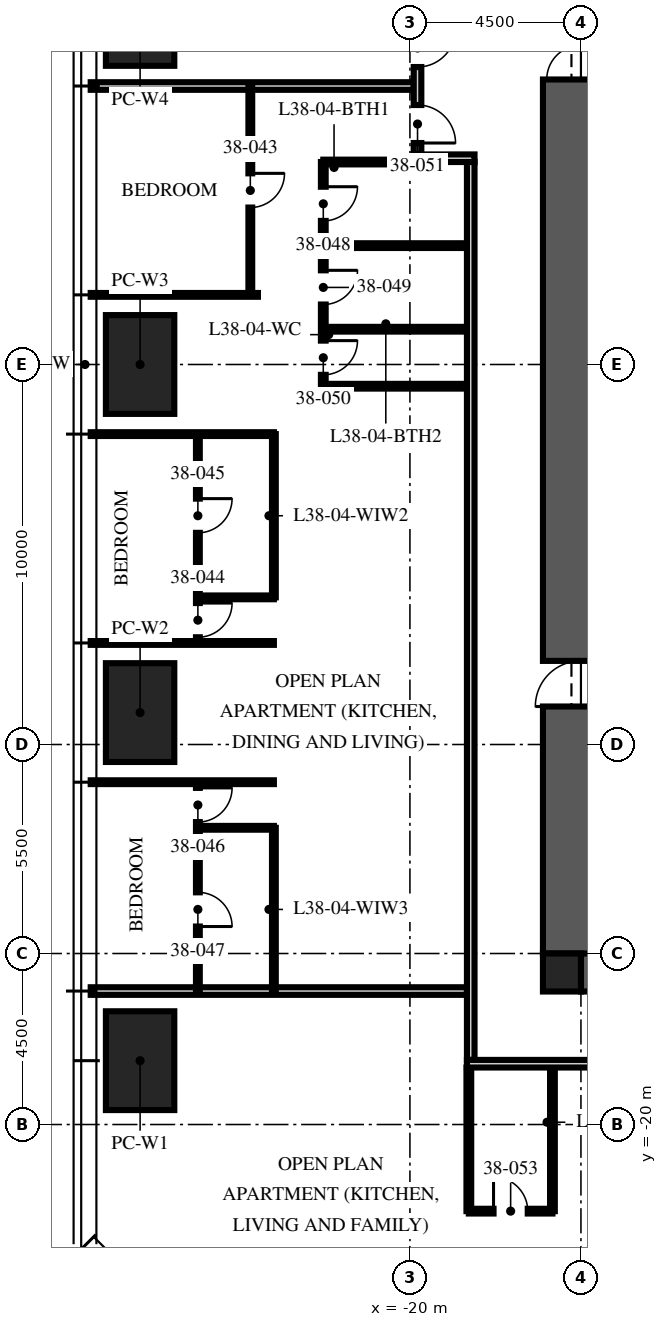
"""IFC4 building model, lengths in metres.
Left out: names, types, materials, properties, quantities, classifications, styles, units other than length and angle.
Written with IfcOpenShell. Run it as: python <this file> out.ifc"""

import sys

from ifc_helpers import new_model, si_unit, direction, frame, frame_2d, origin, origin_2d, place, context, subcontext, project, spatial, rectangle, extrude, element, fill, save


model = new_model("IFC4")
c1 = context("Model", 3, precision=1e-05, world=origin(), true_north=direction((0.0, 1.0)))
c2 = subcontext(c1, "Body", "Model", "MODEL_VIEW")
j1 = project(units=[si_unit("LENGTHUNIT", "METRE"), si_unit("PLANEANGLEUNIT", "RADIAN")], contexts=[c1])
p1 = place(None, origin())
s1 = spatial("IfcSite", under=j1, at=p1, CompositionType="ELEMENT")
p2 = place(p1, origin())
s2 = spatial("IfcBuilding", under=s1, at=p2, CompositionType="ELEMENT")
p3 = place(p2, frame((0.0, 0.0, 152.25)))
s3 = spatial("IfcBuildingStorey", under=s2, at=p3, CompositionType="ELEMENT", Elevation=152.25)
p4 = place(p3, frame((-15.5, -15.5, -0.25), z_axis=(0.0, 0.0, 1.0), x_axis=(1.0, 0.0, 0.0)))
e1 = element("IfcWall", 1, at=p4, inside=s3, PredefinedType="SHEAR", context=c2, shape_type="SweptSolid", body=[
    extrude(rectangle(XDim=31.0, YDim=2.0, at=frame_2d((15.5, 0.0))), origin(), (0.0, 0.0, 1.0), 3.75),
])
p5 = place(p4, frame((10.4, 0.0, 0.25)))
e2 = element("IfcOpeningElement", 2, at=p5, cuts=e1, PredefinedType="OPENING", context=c2, shape_type="SweptSolid", body=[
    extrude(rectangle(XDim=1.1, YDim=2.1, at=frame_2d((0.55, 1.05))), frame((0.0, 1.01, 0.0), z_axis=(0.0, -1.0, 0.0), x_axis=(1.0, 0.0, 0.0)), (0.0, 0.0, 1.0), 2.02),
])
p6 = place(p4, frame((13.5, 0.0, 0.25)))
e3 = element("IfcOpeningElement", 3, at=p6, cuts=e1, PredefinedType="OPENING", context=c2, shape_type="SweptSolid", body=[
    extrude(rectangle(XDim=1.1, YDim=2.1, at=frame_2d((0.55, 1.05))), frame((0.0, 1.01, 0.0), z_axis=(0.0, -1.0, 0.0), x_axis=(1.0, 0.0, 0.0)), (0.0, 0.0, 1.0), 2.02),
])
p7 = place(p4, frame((16.6, 0.0, 0.25)))
e4 = element("IfcOpeningElement", 4, at=p7, cuts=e1, PredefinedType="OPENING", context=c2, shape_type="SweptSolid", body=[
    extrude(rectangle(XDim=1.1, YDim=2.1, at=frame_2d((0.55, 1.05))), frame((0.0, 1.01, 0.0), z_axis=(0.0, -1.0, 0.0), x_axis=(1.0, 0.0, 0.0)), (0.0, 0.0, 1.0), 2.02),
])
p8 = place(p3, frame((-15.5, -12.0, -0.25), z_axis=(0.0, 0.0, 1.0), x_axis=(1.0, 0.0, 0.0)))
e5 = element("IfcWall", 5, at=p8, inside=s3, PredefinedType="SHEAR", context=c2, shape_type="SweptSolid", body=[
    extrude(rectangle(XDim=31.0, YDim=0.8, at=frame_2d((15.5, 0.0))), origin(), (0.0, 0.0, 1.0), 3.75),
])
p9 = place(p3, frame((-15.5, -15.5, -0.25), z_axis=(0.0, 0.0, 1.0), x_axis=(0.0, 1.0, 0.0)))
e6 = element("IfcWall", 6, at=p9, inside=s3, PredefinedType="SHEAR", context=c2, shape_type="SweptSolid", body=[
    extrude(rectangle(XDim=31.0, YDim=2.0, at=frame_2d((15.5, 0.0))), origin(), (0.0, 0.0, 1.0), 3.75),
])
p10 = place(p9, frame((6.5, 0.0, 0.25)))
e7 = element("IfcOpeningElement", 7, at=p10, cuts=e6, PredefinedType="OPENING", context=c2, shape_type="SweptSolid", body=[
    extrude(rectangle(XDim=1.2, YDim=2.1, at=frame_2d((0.6, 1.05))), frame((0.0, 1.01, 0.0), z_axis=(0.0, -1.0, 0.0), x_axis=(1.0, 0.0, 0.0)), (0.0, 0.0, 1.0), 2.02),
])
p11 = place(p9, frame((23.0, 0.0, 0.25)))
e8 = element("IfcOpeningElement", 8, at=p11, cuts=e6, PredefinedType="OPENING", context=c2, shape_type="SweptSolid", body=[
    extrude(rectangle(XDim=1.8, YDim=2.1, at=frame_2d((0.9, 1.05))), frame((0.0, 1.01, 0.0), z_axis=(0.0, -1.0, 0.0), x_axis=(1.0, 0.0, 0.0)), (0.0, 0.0, 1.0), 2.02),
])
p12 = place(p3, frame((-16.0, -16.0, -0.25), z_axis=(0.0, 0.0, 1.0), x_axis=(1.0, 0.0, 0.0)))
e9 = element("IfcColumn", 9, at=p12, inside=s3, PredefinedType="COLUMN", context=c2, shape_type="SweptSolid", body=[
    extrude(rectangle(XDim=1.0, YDim=1.0, at=origin_2d()), origin(), (0.0, 0.0, 1.0), 3.75),
])
for number, where, z_axis, x_axis in (
    (10, (-27.1, -18.32, 0.0), (0.0, 0.0, 1.0), (0.0, 1.0, 0.0)),
    (11, (-27.1, -9.16, 0.0), (0.0, 0.0, 1.0), (0.0, 1.0, 0.0)),
    (12, (-27.1, 0.0, 0.0), (0.0, 0.0, 1.0), (0.0, 1.0, 0.0)),
    (13, (-27.1, 9.16, 0.0), (0.0, 0.0, 1.0), (0.0, 1.0, 0.0)),
):
    element("IfcColumn", number, at=place(p3, frame(where, z_axis=z_axis, x_axis=x_axis)), inside=s3, PredefinedType="COLUMN", context=c2, shape_type="SweptSolid", body=[
        extrude(rectangle(XDim=2.6, YDim=1.8, at=origin_2d()), origin(), (0.0, 0.0, 1.0), 3.75),
    ])
p13 = place(p3, frame((-19.9, 7.328, 0.0), z_axis=(0.0, 0.0, 1.0), x_axis=(-1.0, 0.0, 0.0)))
e14 = element("IfcWall", 14, at=p13, inside=s3, PredefinedType="PARTITIONING", context=c2, shape_type="SweptSolid", body=[
    extrude(rectangle(XDim=8.5, YDim=0.2, at=frame_2d((4.25, 0.0))), origin(), (0.0, 0.0, 1.0), 2.81),
])
p14 = place(p3, frame((-24.0, 1.832, 0.0), z_axis=(0.0, 0.0, 1.0), x_axis=(-1.0, 0.0, 0.0)))
e15 = element("IfcWall", 15, at=p14, inside=s3, PredefinedType="PARTITIONING", context=c2, shape_type="SweptSolid", body=[
    extrude(rectangle(XDim=4.4, YDim=0.1, at=frame_2d((2.2, 0.0))), origin(), (0.0, 0.0, 1.0), 2.81),
])
for number, where, z_axis, x_axis in (
    (16, (-23.58, -1.832, 0.0), (0.0, 0.0, 1.0), (-1.0, 0.0, 0.0)),
    (17, (-23.58, -7.328, 0.0), (0.0, 0.0, 1.0), (-1.0, 0.0, 0.0)),
    (18, (-23.58, -10.992, 0.0), (0.0, 0.0, 1.0), (-1.0, 0.0, 0.0)),
):
    element("IfcWall", number, at=place(p3, frame(where, z_axis=z_axis, x_axis=x_axis)), inside=s3, PredefinedType="PARTITIONING", context=c2, shape_type="SweptSolid", body=[
        extrude(rectangle(XDim=4.82, YDim=0.1, at=frame_2d((2.41, 0.0))), origin(), (0.0, 0.0, 1.0), 2.81),
    ])
p15 = place(p3, frame((-18.5, -16.488, 0.0), z_axis=(0.0, 0.0, 1.0), x_axis=(-1.0, 0.0, 0.0)))
e19 = element("IfcWall", 19, at=p15, inside=s3, PredefinedType="PARTITIONING", context=c2, shape_type="SweptSolid", body=[
    extrude(rectangle(XDim=9.9, YDim=0.2, at=frame_2d((4.95, 0.0))), origin(), (0.0, 0.0, 1.0), 2.81),
])
p16 = place(p3, frame((-24.2, 7.328, 0.0), z_axis=(0.0, 0.0, 1.0), x_axis=(0.0, -1.0, 0.0)))
e20 = element("IfcWall", 20, at=p16, inside=s3, PredefinedType="PARTITIONING", context=c2, shape_type="SweptSolid", body=[
    extrude(rectangle(XDim=5.496, YDim=0.1, at=frame_2d((2.748, 0.0))), origin(), (0.0, 0.0, 1.0), 2.81),
])
p17 = place(p16, frame((2.298, 0.0, 0.0)))
e21 = element("IfcOpeningElement", 21, at=p17, cuts=e20, PredefinedType="OPENING", context=c2, shape_type="SweptSolid", body=[
    extrude(rectangle(XDim=0.9, YDim=2.1, at=frame_2d((0.45, 1.05))), frame((0.0, 0.06, 0.0), z_axis=(0.0, -1.0, 0.0), x_axis=(1.0, 0.0, 0.0)), (0.0, 0.0, 1.0), 0.12),
])
p18 = place(p3, frame((-25.58, -1.832, 0.0), z_axis=(0.0, 0.0, 1.0), x_axis=(0.0, -1.0, 0.0)))
e22 = element("IfcWall", 22, at=p18, inside=s3, PredefinedType="PARTITIONING", context=c2, shape_type="SweptSolid", body=[
    extrude(rectangle(XDim=5.496, YDim=0.1, at=frame_2d((2.748, 0.0))), origin(), (0.0, 0.0, 1.0), 2.81),
])
p19 = place(p18, frame((4.446, 0.0, 0.0)))
e23 = element("IfcOpeningElement", 23, at=p19, cuts=e22, PredefinedType="OPENING", context=c2, shape_type="SweptSolid", body=[
    extrude(rectangle(XDim=0.9, YDim=2.1, at=frame_2d((0.45, 1.05))), frame((0.0, 0.06, 0.0), z_axis=(0.0, -1.0, 0.0), x_axis=(1.0, 0.0, 0.0)), (0.0, 0.0, 1.0), 0.12),
])
p20 = place(p18, frame((1.698, 0.0, 0.0)))
e24 = element("IfcOpeningElement", 24, at=p20, cuts=e22, PredefinedType="OPENING", context=c2, shape_type="SweptSolid", body=[
    extrude(rectangle(XDim=0.9, YDim=2.1, at=frame_2d((0.45, 1.05))), frame((0.0, 0.06, 0.0), z_axis=(0.0, -1.0, 0.0), x_axis=(1.0, 0.0, 0.0)), (0.0, 0.0, 1.0), 0.12),
])
p21 = place(p3, frame((-23.58, -6.128, 0.0), z_axis=(0.0, 0.0, 1.0), x_axis=(-1.0, 0.0, 0.0)))
e25 = element("IfcWall", 25, at=p21, inside=s3, PredefinedType="PARTITIONING", context=c2, shape_type="SweptSolid", body=[
    extrude(rectangle(XDim=2.0, YDim=0.1, at=frame_2d((1.0, 0.0))), origin(), (0.0, 0.0, 1.0), 3.5),
])
p22 = place(p3, frame((-23.58, -1.832, 0.0), z_axis=(0.0, 0.0, 1.0), x_axis=(0.0, -1.0, 0.0)))
e26 = element("IfcWall", 26, at=p22, inside=s3, PredefinedType="PARTITIONING", context=c2, shape_type="SweptSolid", body=[
    extrude(rectangle(XDim=4.296, YDim=0.1, at=frame_2d((2.148, 0.0))), origin(), (0.0, 0.0, 1.0), 2.81),
])
p23 = place(p3, frame((-25.58, -10.992, 0.0), z_axis=(0.0, 0.0, 1.0), x_axis=(0.0, -1.0, 0.0)))
e27 = element("IfcWall", 27, at=p23, inside=s3, PredefinedType="PARTITIONING", context=c2, shape_type="SweptSolid", body=[
    extrude(rectangle(XDim=5.496, YDim=0.1, at=frame_2d((2.748, 0.0))), origin(), (0.0, 0.0, 1.0), 2.81),
])
p24 = place(p23, frame((0.15, 0.0, 0.0)))
e28 = element("IfcOpeningElement", 28, at=p24, cuts=e27, PredefinedType="OPENING", context=c2, shape_type="SweptSolid", body=[
    extrude(rectangle(XDim=0.9, YDim=2.1, at=frame_2d((0.45, 1.05))), frame((0.0, 0.06, 0.0), z_axis=(0.0, -1.0, 0.0), x_axis=(1.0, 0.0, 0.0)), (0.0, 0.0, 1.0), 0.12),
])
p25 = place(p23, frame((2.898, 0.0, 0.0)))
e29 = element("IfcOpeningElement", 29, at=p25, cuts=e27, PredefinedType="OPENING", context=c2, shape_type="SweptSolid", body=[
    extrude(rectangle(XDim=0.9, YDim=2.1, at=frame_2d((0.45, 1.05))), frame((0.0, 0.06, 0.0), z_axis=(0.0, -1.0, 0.0), x_axis=(1.0, 0.0, 0.0)), (0.0, 0.0, 1.0), 0.12),
])
p26 = place(p3, frame((-23.58, -12.192, 0.0), z_axis=(0.0, 0.0, 1.0), x_axis=(-1.0, 0.0, 0.0)))
e30 = element("IfcWall", 30, at=p26, inside=s3, PredefinedType="PARTITIONING", context=c2, shape_type="SweptSolid", body=[
    extrude(rectangle(XDim=2.0, YDim=0.1, at=frame_2d((1.0, 0.0))), origin(), (0.0, 0.0, 1.0), 3.5),
])
p27 = place(p3, frame((-23.58, -12.192, 0.0), z_axis=(0.0, 0.0, 1.0), x_axis=(0.0, -1.0, 0.0)))
e31 = element("IfcWall", 31, at=p27, inside=s3, PredefinedType="PARTITIONING", context=c2, shape_type="SweptSolid", body=[
    extrude(rectangle(XDim=4.296, YDim=0.1, at=frame_2d((2.148, 0.0))), origin(), (0.0, 0.0, 1.0), 2.81),
])
p28 = place(p3, frame((-22.28, 5.328, 0.0), z_axis=(0.0, 0.0, 1.0), x_axis=(0.0, -1.0, 0.0)))
e32 = element("IfcWall", 32, at=p28, inside=s3, PredefinedType="PARTITIONING", context=c2, shape_type="SweptSolid", body=[
    extrude(rectangle(XDim=5.9, YDim=0.125, at=frame_2d((2.95, 0.0))), origin(), (0.0, 0.0, 1.0), 2.7),
])
p29 = place(p28, frame((0.65, 0.0, 0.0)))
e33 = element("IfcOpeningElement", 33, at=p29, cuts=e32, PredefinedType="OPENING", context=c2, shape_type="SweptSolid", body=[
    extrude(rectangle(XDim=0.9, YDim=2.1, at=frame_2d((0.45, 1.05))), frame((0.0, 0.073, 0.0), z_axis=(0.0, -1.0, 0.0), x_axis=(1.0, 0.0, 0.0)), (0.0, 0.0, 1.0), 0.145),
])
p30 = place(p28, frame((2.85, 0.0, 0.0)))
e34 = element("IfcOpeningElement", 34, at=p30, cuts=e32, PredefinedType="OPENING", context=c2, shape_type="SweptSolid", body=[
    extrude(rectangle(XDim=0.9, YDim=2.1, at=frame_2d((0.45, 1.05))), frame((0.0, 0.073, 0.0), z_axis=(0.0, -1.0, 0.0), x_axis=(1.0, 0.0, 0.0)), (0.0, 0.0, 1.0), 0.145),
])
p31 = place(p28, frame((4.7, 0.0, 0.0)))
e35 = element("IfcOpeningElement", 35, at=p31, cuts=e32, PredefinedType="OPENING", context=c2, shape_type="SweptSolid", body=[
    extrude(rectangle(XDim=0.9, YDim=2.1, at=frame_2d((0.45, 1.05))), frame((0.0, 0.073, 0.0), z_axis=(0.0, -1.0, 0.0), x_axis=(1.0, 0.0, 0.0)), (0.0, 0.0, 1.0), 0.145),
])
p32 = place(p3, frame((-19.97, 5.328, 0.0), z_axis=(0.0, 0.0, 1.0), x_axis=(-1.0, 0.0, 0.0)))
e36 = element("IfcWall", 36, at=p32, inside=s3, PredefinedType="PARTITIONING", context=c2, shape_type="SweptSolid", body=[
    extrude(rectangle(XDim=2.31, YDim=0.125, at=frame_2d((1.155, 0.0))), origin(), (0.0, 0.0, 1.0), 3.5),
])
for number, where, z_axis, x_axis in (
    (37, (-18.5, 3.128, 0.0), (0.0, 0.0, 1.0), (-1.0, 0.0, 0.0)),
    (38, (-18.5, 0.928, 0.0), (0.0, 0.0, 1.0), (-1.0, 0.0, 0.0)),
    (39, (-18.5, -0.572, 0.0), (0.0, 0.0, 1.0), (-1.0, 0.0, 0.0)),
):
    element("IfcWall", number, at=place(p3, frame(where, z_axis=z_axis, x_axis=x_axis)), inside=s3, PredefinedType="PARTITIONING", context=c2, shape_type="SweptSolid", body=[
        extrude(rectangle(XDim=3.78, YDim=0.125, at=frame_2d((1.89, 0.0))), origin(), (0.0, 0.0, 1.0), 3.5),
    ])
p33 = place(p3, frame((-18.45, -22.28, 0.0), z_axis=(0.0, 0.0, 1.0), x_axis=(1.0, 0.0, 0.0)))
e40 = element("IfcWall", 40, at=p33, inside=s3, PredefinedType="PARTITIONING", context=c2, shape_type="SweptSolid", body=[
    extrude(rectangle(XDim=2.2, YDim=0.125, at=frame_2d((1.1, 0.0))), origin(), (0.0, 0.0, 1.0), 2.7),
])
p34 = place(p33, frame((0.65, 0.0, 0.0)))
e41 = element("IfcOpeningElement", 41, at=p34, cuts=e40, PredefinedType="OPENING", context=c2, shape_type="SweptSolid", body=[
    extrude(rectangle(XDim=0.9, YDim=2.1, at=frame_2d((0.45, 1.05))), frame((0.0, 0.073, 0.0), z_axis=(0.0, -1.0, 0.0), x_axis=(1.0, 0.0, 0.0)), (0.0, 0.0, 1.0), 0.145),
])
p35 = place(p3, frame((-18.45, -18.5, 0.0), z_axis=(0.0, 0.0, 1.0), x_axis=(0.0, -1.0, 0.0)))
e42 = element("IfcWall", 42, at=p35, inside=s3, PredefinedType="PARTITIONING", context=c2, shape_type="SweptSolid", body=[
    extrude(rectangle(XDim=3.78, YDim=0.125, at=frame_2d((1.89, 0.0))), origin(), (0.0, 0.0, 1.0), 2.3),
])
p36 = place(p3, frame((-16.25, -18.5, 0.0), z_axis=(0.0, 0.0, 1.0), x_axis=(0.0, -1.0, 0.0)))
e43 = element("IfcWall", 43, at=p36, inside=s3, PredefinedType="PARTITIONING", context=c2, shape_type="SweptSolid", body=[
    extrude(rectangle(XDim=3.78, YDim=0.125, at=frame_2d((1.89, 0.0))), origin(), (0.0, 0.0, 1.0), 3.5),
])
p37 = place(p3, frame((-18.3, 5.428, 0.0), z_axis=(0.0, 0.0, 1.0), x_axis=(-1.0, 0.0, 0.0)))
e44 = element("IfcWall", 44, at=p37, inside=s3, PredefinedType="PARTITIONING", context=c2, shape_type="SweptSolid", body=[
    extrude(rectangle(XDim=1.6, YDim=0.2, at=frame_2d((0.8, 0.0))), origin(), (0.0, 0.0, 1.0), 3.5),
])
p38 = place(p3, frame((-19.8, 9.128, 0.0), z_axis=(0.0, 0.0, 1.0), x_axis=(0.0, -1.0, 0.0)))
e45 = element("IfcWall", 45, at=p38, inside=s3, PredefinedType="PARTITIONING", context=c2, shape_type="SweptSolid", body=[
    extrude(rectangle(XDim=3.6, YDim=0.2, at=frame_2d((1.8, 0.0))), origin(), (0.0, 0.0, 1.0), 2.7),
])
p39 = place(p38, frame((0.3, 0.0, 0.0)))
e46 = element("IfcOpeningElement", 46, at=p39, cuts=e45, PredefinedType="OPENING", context=c2, shape_type="SweptSolid", body=[
    extrude(rectangle(XDim=1.0, YDim=2.2, at=frame_2d((0.5, 1.1))), frame((0.0, 0.11, 0.0), z_axis=(0.0, -1.0, 0.0), x_axis=(1.0, 0.0, 0.0)), (0.0, 0.0, 1.0), 0.22),
])
p40 = place(p38, frame((2.3, 0.0, 0.0)))
e47 = element("IfcOpeningElement", 47, at=p40, cuts=e45, PredefinedType="OPENING", context=c2, shape_type="SweptSolid", body=[
    extrude(rectangle(XDim=1.0, YDim=2.2, at=frame_2d((0.5, 1.1))), frame((0.0, 0.11, 0.0), z_axis=(0.0, -1.0, 0.0), x_axis=(1.0, 0.0, 0.0)), (0.0, 0.0, 1.0), 0.22),
])
p41 = place(p3, frame((-18.4, 5.328, 0.0), z_axis=(0.0, 0.0, 1.0), x_axis=(0.0, -1.0, 0.0)))
e48 = element("IfcWall", 48, at=p41, inside=s3, PredefinedType="PARTITIONING", context=c2, shape_type="SweptSolid", body=[
    extrude(rectangle(XDim=23.628, YDim=0.2, at=frame_2d((11.814, 0.0))), origin(), (0.0, 0.0, 1.0), 2.3),
])
p42 = place(p3, frame((-8.6, -18.4, 0.0), z_axis=(0.0, 0.0, 1.0), x_axis=(-1.0, 0.0, 0.0)))
e49 = element("IfcWall", 49, at=p42, inside=s3, PredefinedType="PARTITIONING", context=c2, shape_type="SweptSolid", body=[
    extrude(rectangle(XDim=9.9, YDim=0.2, at=frame_2d((4.95, 0.0))), origin(), (0.0, 0.0, 1.0), 2.3),
])
p43 = place(p42, frame((0.75, 0.0, 0.0)))
e50 = element("IfcOpeningElement", 50, at=p43, cuts=e49, PredefinedType="OPENING", context=c2, shape_type="SweptSolid", body=[
    extrude(rectangle(XDim=1.0, YDim=2.2, at=frame_2d((0.5, 1.1))), frame((0.0, 0.11, 0.0), z_axis=(0.0, -1.0, 0.0), x_axis=(1.0, 0.0, 0.0)), (0.0, 0.0, 1.0), 0.22),
])
p44 = place(p10, origin())
e51 = element("IfcDoor", 51, at=p44, inside=s3, OperationType="SINGLE_SWING_LEFT", PredefinedType="DOOR", context=c2, shape_type="SweptSolid", body=[
    extrude(rectangle(XDim=1.2, YDim=2.1, at=frame_2d((0.6, 1.05))), frame((0.0, 0.025, 0.0), z_axis=(0.0, -1.0, 0.0), x_axis=(1.0, 0.0, 0.0)), (0.0, 0.0, 1.0), 0.05),
])
fill(e7, e51)
p45 = place(p11, origin())
e52 = element("IfcDoor", 52, at=p45, inside=s3, OperationType="DOUBLE_DOOR_SINGLE_SWING", PredefinedType="DOOR", context=c2, shape_type="SweptSolid", body=[
    extrude(rectangle(XDim=1.8, YDim=2.1, at=frame_2d((0.9, 1.05))), frame((0.0, 0.025, 0.0), z_axis=(0.0, -1.0, 0.0), x_axis=(1.0, 0.0, 0.0)), (0.0, 0.0, 1.0), 0.05),
])
fill(e8, e52)
p46 = place(p39, origin())
e53 = element("IfcDoor", 53, at=p46, inside=s3, OperationType="SINGLE_SWING_LEFT", PredefinedType="DOOR", context=c2, shape_type="SweptSolid", body=[
    extrude(rectangle(XDim=1.0, YDim=2.2, at=frame_2d((0.5, 1.1))), frame((0.0, 0.025, 0.0), z_axis=(0.0, -1.0, 0.0), x_axis=(1.0, 0.0, 0.0)), (0.0, 0.0, 1.0), 0.05),
])
fill(e46, e53)
p47 = place(p17, origin())
e54 = element("IfcDoor", 54, at=p47, inside=s3, OperationType="SINGLE_SWING_LEFT", PredefinedType="DOOR", context=c2, shape_type="SweptSolid", body=[
    extrude(rectangle(XDim=0.9, YDim=2.1, at=frame_2d((0.45, 1.05))), frame((0.0, 0.025, 0.0), z_axis=(0.0, -1.0, 0.0), x_axis=(1.0, 0.0, 0.0)), (0.0, 0.0, 1.0), 0.05),
])
fill(e21, e54)
p48 = place(p19, origin())
e55 = element("IfcDoor", 55, at=p48, inside=s3, OperationType="SINGLE_SWING_LEFT", PredefinedType="DOOR", context=c2, shape_type="SweptSolid", body=[
    extrude(rectangle(XDim=0.9, YDim=2.1, at=frame_2d((0.45, 1.05))), frame((0.0, 0.025, 0.0), z_axis=(0.0, -1.0, 0.0), x_axis=(1.0, 0.0, 0.0)), (0.0, 0.0, 1.0), 0.05),
])
fill(e23, e55)
p49 = place(p20, origin())
e56 = element("IfcDoor", 56, at=p49, inside=s3, OperationType="SINGLE_SWING_LEFT", PredefinedType="DOOR", context=c2, shape_type="SweptSolid", body=[
    extrude(rectangle(XDim=0.9, YDim=2.1, at=frame_2d((0.45, 1.05))), frame((0.0, 0.025, 0.0), z_axis=(0.0, -1.0, 0.0), x_axis=(1.0, 0.0, 0.0)), (0.0, 0.0, 1.0), 0.05),
])
fill(e24, e56)
p50 = place(p24, origin())
e57 = element("IfcDoor", 57, at=p50, inside=s3, OperationType="SINGLE_SWING_LEFT", PredefinedType="DOOR", context=c2, shape_type="SweptSolid", body=[
    extrude(rectangle(XDim=0.9, YDim=2.1, at=frame_2d((0.45, 1.05))), frame((0.0, 0.025, 0.0), z_axis=(0.0, -1.0, 0.0), x_axis=(1.0, 0.0, 0.0)), (0.0, 0.0, 1.0), 0.05),
])
fill(e28, e57)
p51 = place(p25, origin())
e58 = element("IfcDoor", 58, at=p51, inside=s3, OperationType="SINGLE_SWING_RIGHT", PredefinedType="DOOR", context=c2, shape_type="SweptSolid", body=[
    extrude(rectangle(XDim=0.9, YDim=2.1, at=frame_2d((0.45, 1.05))), frame((0.0, 0.025, 0.0), z_axis=(0.0, -1.0, 0.0), x_axis=(1.0, 0.0, 0.0)), (0.0, 0.0, 1.0), 0.05),
])
fill(e29, e58)
p52 = place(p29, origin())
e59 = element("IfcDoor", 59, at=p52, inside=s3, OperationType="SINGLE_SWING_LEFT", PredefinedType="DOOR", context=c2, shape_type="SweptSolid", body=[
    extrude(rectangle(XDim=0.9, YDim=2.1, at=frame_2d((0.45, 1.05))), frame((0.0, 0.025, 0.0), z_axis=(0.0, -1.0, 0.0), x_axis=(1.0, 0.0, 0.0)), (0.0, 0.0, 1.0), 0.05),
])
fill(e33, e59)
p53 = place(p30, origin())
e60 = element("IfcDoor", 60, at=p53, inside=s3, OperationType="SINGLE_SWING_LEFT", PredefinedType="DOOR", context=c2, shape_type="SweptSolid", body=[
    extrude(rectangle(XDim=0.9, YDim=2.1, at=frame_2d((0.45, 1.05))), frame((0.0, 0.025, 0.0), z_axis=(0.0, -1.0, 0.0), x_axis=(1.0, 0.0, 0.0)), (0.0, 0.0, 1.0), 0.05),
])
fill(e34, e60)
p54 = place(p31, origin())
e61 = element("IfcDoor", 61, at=p54, inside=s3, OperationType="SINGLE_SWING_LEFT", PredefinedType="DOOR", context=c2, shape_type="SweptSolid", body=[
    extrude(rectangle(XDim=0.9, YDim=2.1, at=frame_2d((0.45, 1.05))), frame((0.0, 0.025, 0.0), z_axis=(0.0, -1.0, 0.0), x_axis=(1.0, 0.0, 0.0)), (0.0, 0.0, 1.0), 0.05),
])
fill(e35, e61)
p55 = place(p40, origin())
e62 = element("IfcDoor", 62, at=p55, inside=s3, OperationType="SINGLE_SWING_RIGHT", PredefinedType="DOOR", context=c2, shape_type="SweptSolid", body=[
    extrude(rectangle(XDim=1.0, YDim=2.2, at=frame_2d((0.5, 1.1))), frame((0.0, 0.025, 0.0), z_axis=(0.0, -1.0, 0.0), x_axis=(1.0, 0.0, 0.0)), (0.0, 0.0, 1.0), 0.05),
])
fill(e47, e62)
p56 = place(p34, origin())
e63 = element("IfcDoor", 63, at=p56, inside=s3, OperationType="SINGLE_SWING_LEFT", PredefinedType="DOOR", context=c2, shape_type="SweptSolid", body=[
    extrude(rectangle(XDim=0.9, YDim=2.1, at=frame_2d((0.45, 1.05))), frame((0.0, 0.025, 0.0), z_axis=(0.0, -1.0, 0.0), x_axis=(1.0, 0.0, 0.0)), (0.0, 0.0, 1.0), 0.05),
])
fill(e41, e63)
save(model, sys.argv[1])
